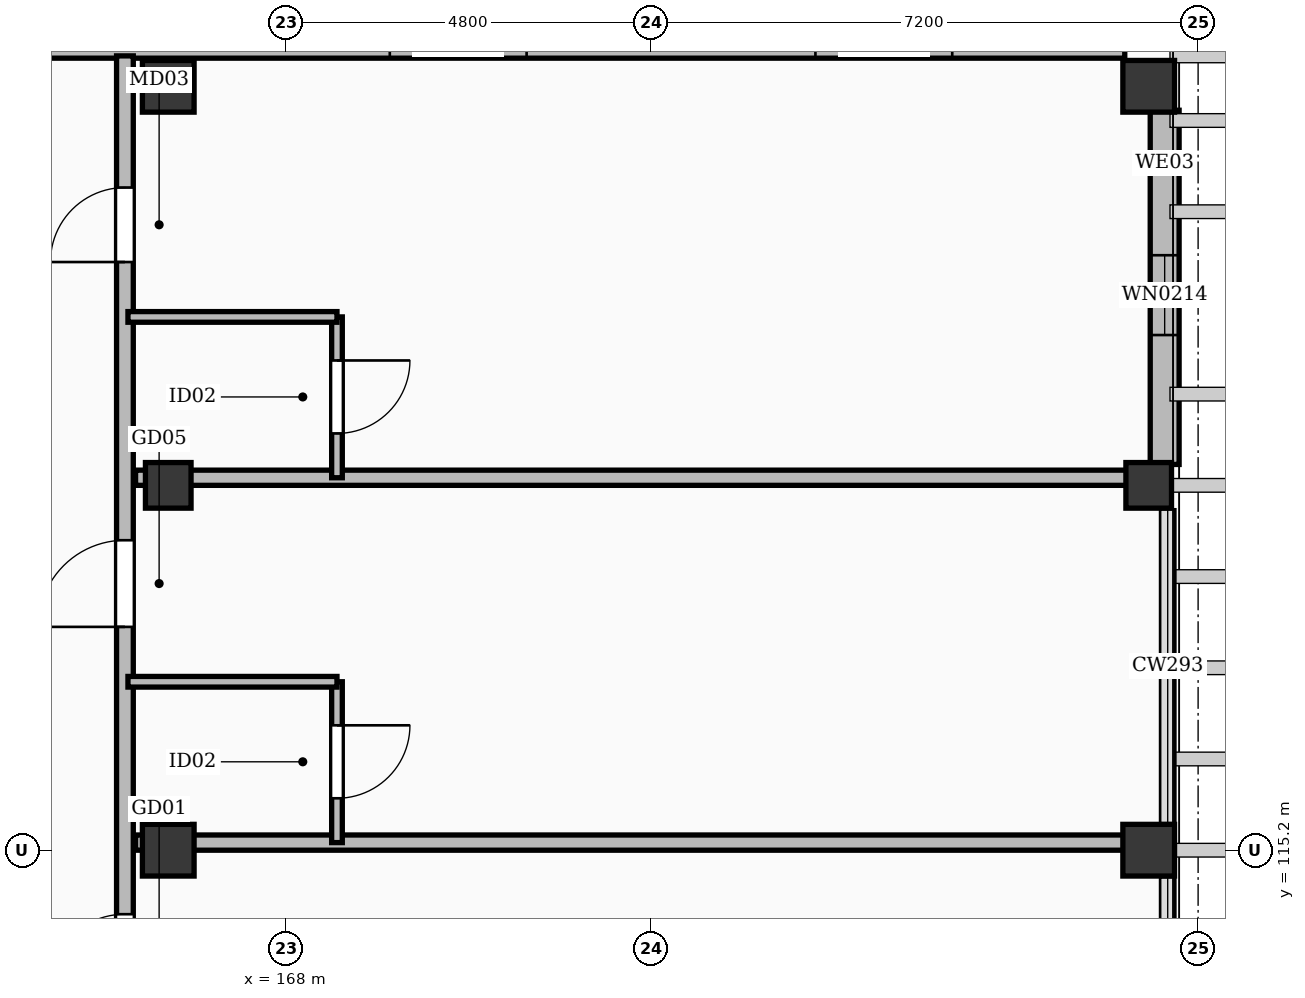
"""IFC4 building model, lengths in metres.
Left out: names, types, materials, properties, quantities, classifications, styles, units other than length and angle.
Written with IfcOpenShell. Run it as: python <this file> out.ifc"""

import sys

from ifc_helpers import new_model, si_unit, direction, frame, frame_2d, origin, origin_2d, place, context, subcontext, project, spatial, rectangle, extrude, element, fill, save


model = new_model("IFC4")
c1 = context("Model", 3, precision=1e-05, world=origin(), true_north=direction((0.0, 1.0)))
c2 = subcontext(c1, "Body", "Model", "MODEL_VIEW")
j1 = project(units=[si_unit("LENGTHUNIT", "METRE"), si_unit("PLANEANGLEUNIT", "RADIAN")], contexts=[c1])
p1 = place(None, origin())
s1 = spatial("IfcSite", under=j1, at=p1, CompositionType="ELEMENT")
p2 = place(p1, origin())
s2 = spatial("IfcBuilding", under=s1, at=p2, CompositionType="ELEMENT")
p3 = place(p2, frame((0.0, 0.0, 35.4)))
s3 = spatial("IfcBuildingStorey", under=s2, at=p3, CompositionType="ELEMENT", Elevation=35.4)
for number, where, z_axis, x_axis in (
    (1, (166.45, 115.2, 0.0), (0.0, 0.0, 1.0), (1.0, 0.0, 0.0)),
    (2, (166.45, 125.25, 0.0), (0.0, 0.0, 1.0), (1.0, 0.0, 0.0)),
    (3, (179.35, 115.2, 0.0), (0.0, 0.0, 1.0), (1.0, 0.0, 0.0)),
    (4, (179.35, 125.25, 0.0), (0.0, 0.0, 1.0), (1.0, 0.0, 0.0)),
):
    element("IfcColumn", number, at=place(p3, frame(where, z_axis=z_axis, x_axis=x_axis)), inside=s3, PredefinedType="COLUMN", context=c2, shape_type="SweptSolid", body=[
        extrude(rectangle(XDim=0.68, YDim=0.68, at=origin_2d()), origin(), (0.0, 0.0, 1.0), 3.6),
    ])
for number, where, z_axis, x_axis in (
    (5, (166.45, 120.0, 0.0), (0.0, 0.0, 1.0), (1.0, 0.0, 0.0)),
    (6, (179.35, 120.0, 0.0), (0.0, 0.0, 1.0), (1.0, 0.0, 0.0)),
):
    element("IfcColumn", number, at=place(p3, frame(where, z_axis=z_axis, x_axis=x_axis)), inside=s3, PredefinedType="COLUMN", context=c2, shape_type="SweptSolid", body=[
        extrude(rectangle(XDim=0.6, YDim=0.6, at=origin_2d()), origin(), (0.0, 0.0, 1.0), 3.6),
    ])
p4 = place(p3, frame((149.765, 125.81, 0.0), z_axis=(0.0, 0.0, 1.0), x_axis=(1.0, 0.0, 0.0)))
e7 = element("IfcWall", 7, at=p4, inside=s3, PredefinedType="SOLIDWALL", context=c2, shape_type="SweptSolid", body=[
    extrude(rectangle(XDim=29.27, YDim=0.38, at=frame_2d((14.635, 0.0))), origin(), (0.0, 0.0, 1.0), 3.36),
])
p5 = place(p4, frame((3.6, 0.0, 0.55)))
e8 = element("IfcOpeningElement", 8, at=p5, cuts=e7, PredefinedType="OPENING", context=c2, shape_type="SweptSolid", body=[
    extrude(rectangle(XDim=1.8, YDim=1.76, at=frame_2d((0.9, 0.88))), frame((0.0, 0.202, 0.0), z_axis=(0.0, -1.0, 0.0), x_axis=(1.0, 0.0, 0.0)), (0.0, 0.0, 1.0), 0.404),
])
p6 = place(p4, frame((9.2, 0.0, 0.55)))
e9 = element("IfcOpeningElement", 9, at=p6, cuts=e7, PredefinedType="OPENING", context=c2, shape_type="SweptSolid", body=[
    extrude(rectangle(XDim=1.8, YDim=1.76, at=frame_2d((0.9, 0.88))), frame((0.0, 0.202, 0.0), z_axis=(0.0, -1.0, 0.0), x_axis=(1.0, 0.0, 0.0)), (0.0, 0.0, 1.0), 0.404),
])
p7 = place(p4, frame((19.6, 0.0, 0.55)))
e10 = element("IfcOpeningElement", 10, at=p7, cuts=e7, PredefinedType="OPENING", context=c2, shape_type="SweptSolid", body=[
    extrude(rectangle(XDim=1.8, YDim=1.76, at=frame_2d((0.9, 0.88))), frame((0.0, 0.202, 0.0), z_axis=(0.0, -1.0, 0.0), x_axis=(1.0, 0.0, 0.0)), (0.0, 0.0, 1.0), 0.404),
])
p8 = place(p4, frame((25.2, 0.0, 0.55)))
e11 = element("IfcOpeningElement", 11, at=p8, cuts=e7, PredefinedType="OPENING", context=c2, shape_type="SweptSolid", body=[
    extrude(rectangle(XDim=1.8, YDim=1.76, at=frame_2d((0.9, 0.88))), frame((0.0, 0.202, 0.0), z_axis=(0.0, -1.0, 0.0), x_axis=(1.0, 0.0, 0.0)), (0.0, 0.0, 1.0), 0.404),
])
p9 = place(p3, frame((179.56, 124.935, 0.0), z_axis=(0.0, 0.0, 1.0), x_axis=(0.0, -1.0, 0.0)))
e12 = element("IfcWall", 12, at=p9, inside=s3, PredefinedType="SOLIDWALL", context=c2, shape_type="SweptSolid", body=[
    extrude(rectangle(XDim=4.66, YDim=0.38, at=frame_2d((2.33, 0.0))), origin(), (0.0, 0.0, 1.0), 2.602),
])
p10 = place(p9, frame((1.907, 0.0, 0.55)))
e13 = element("IfcOpeningElement", 13, at=p10, cuts=e12, PredefinedType="OPENING", context=c2, shape_type="SweptSolid", body=[
    extrude(rectangle(XDim=1.05, YDim=1.65, at=frame_2d((0.525, 0.825))), frame((0.0, 0.202, 0.0), z_axis=(0.0, -1.0, 0.0), x_axis=(1.0, 0.0, 0.0)), (0.0, 0.0, 1.0), 0.404),
])
p11 = place(p3, frame((165.88, 53.15, 0.0), z_axis=(0.0, 0.0, 1.0), x_axis=(0.0, 1.0, 0.0)))
e14 = element("IfcWall", 14, at=p11, inside=s3, PredefinedType="PARTITIONING", context=c2, shape_type="SweptSolid", body=[
    extrude(rectangle(XDim=72.5, YDim=0.22, at=frame_2d((36.25, 0.0))), origin(), (0.0, 0.0, 1.0), 2.602),
])
p12 = place(p11, frame((0.691, 0.0, 0.0)))
e15 = element("IfcOpeningElement", 15, at=p12, cuts=e14, PredefinedType="OPENING", context=c2, shape_type="SweptSolid", body=[
    extrude(rectangle(XDim=1.02, YDim=2.2, at=frame_2d((0.51, 1.1))), frame((0.0, 0.122, 0.0), z_axis=(0.0, -1.0, 0.0), x_axis=(1.0, 0.0, 0.0)), (0.0, 0.0, 1.0), 0.244),
])
p13 = place(p11, frame((7.388, 0.0, 0.0)))
e16 = element("IfcOpeningElement", 16, at=p13, cuts=e14, PredefinedType="OPENING", context=c2, shape_type="SweptSolid", body=[
    extrude(rectangle(XDim=1.14, YDim=2.26, at=frame_2d((0.57, 1.13))), frame((0.0, 0.122, 0.0), z_axis=(0.0, -1.0, 0.0), x_axis=(1.0, 0.0, 0.0)), (0.0, 0.0, 1.0), 0.244),
])
p14 = place(p11, frame((12.188, 0.0, 0.0)))
e17 = element("IfcOpeningElement", 17, at=p14, cuts=e14, PredefinedType="OPENING", context=c2, shape_type="SweptSolid", body=[
    extrude(rectangle(XDim=0.98, YDim=2.15, at=frame_2d((0.49, 1.075))), frame((0.0, 0.122, 0.0), z_axis=(0.0, -1.0, 0.0), x_axis=(1.0, 0.0, 0.0)), (0.0, 0.0, 1.0), 0.244),
])
p15 = place(p11, frame((16.988, 0.0, 0.0)))
e18 = element("IfcOpeningElement", 18, at=p15, cuts=e14, PredefinedType="OPENING", context=c2, shape_type="SweptSolid", body=[
    extrude(rectangle(XDim=1.28, YDim=2.16, at=frame_2d((0.64, 1.08))), frame((0.0, 0.122, 0.0), z_axis=(0.0, -1.0, 0.0), x_axis=(1.0, 0.0, 0.0)), (0.0, 0.0, 1.0), 0.244),
])
p16 = place(p11, frame((21.788, 0.0, 0.0)))
e19 = element("IfcOpeningElement", 19, at=p16, cuts=e14, PredefinedType="OPENING", context=c2, shape_type="SweptSolid", body=[
    extrude(rectangle(XDim=0.9, YDim=2.08, at=frame_2d((0.45, 1.04))), frame((0.0, 0.122, 0.0), z_axis=(0.0, -1.0, 0.0), x_axis=(1.0, 0.0, 0.0)), (0.0, 0.0, 1.0), 0.244),
])
p17 = place(p11, frame((26.588, 0.0, 0.0)))
e20 = element("IfcOpeningElement", 20, at=p17, cuts=e14, PredefinedType="OPENING", context=c2, shape_type="SweptSolid", body=[
    extrude(rectangle(XDim=1.05, YDim=2.22, at=frame_2d((0.525, 1.11))), frame((0.0, 0.122, 0.0), z_axis=(0.0, -1.0, 0.0), x_axis=(1.0, 0.0, 0.0)), (0.0, 0.0, 1.0), 0.244),
])
p18 = place(p11, frame((31.388, 0.0, 0.0)))
e21 = element("IfcOpeningElement", 21, at=p18, cuts=e14, PredefinedType="OPENING", context=c2, shape_type="SweptSolid", body=[
    extrude(rectangle(XDim=1.02, YDim=2.2, at=frame_2d((0.51, 1.1))), frame((0.0, 0.122, 0.0), z_axis=(0.0, -1.0, 0.0), x_axis=(1.0, 0.0, 0.0)), (0.0, 0.0, 1.0), 0.244),
])
p19 = place(p11, frame((36.188, 0.0, 0.0)))
e22 = element("IfcOpeningElement", 22, at=p19, cuts=e14, PredefinedType="OPENING", context=c2, shape_type="SweptSolid", body=[
    extrude(rectangle(XDim=1.14, YDim=2.26, at=frame_2d((0.57, 1.13))), frame((0.0, 0.122, 0.0), z_axis=(0.0, -1.0, 0.0), x_axis=(1.0, 0.0, 0.0)), (0.0, 0.0, 1.0), 0.244),
])
p20 = place(p11, frame((40.988, 0.0, 0.0)))
e23 = element("IfcOpeningElement", 23, at=p20, cuts=e14, PredefinedType="OPENING", context=c2, shape_type="SweptSolid", body=[
    extrude(rectangle(XDim=0.98, YDim=2.15, at=frame_2d((0.49, 1.075))), frame((0.0, 0.122, 0.0), z_axis=(0.0, -1.0, 0.0), x_axis=(1.0, 0.0, 0.0)), (0.0, 0.0, 1.0), 0.244),
])
p21 = place(p11, frame((45.788, 0.0, 0.0)))
e24 = element("IfcOpeningElement", 24, at=p21, cuts=e14, PredefinedType="OPENING", context=c2, shape_type="SweptSolid", body=[
    extrude(rectangle(XDim=1.28, YDim=2.16, at=frame_2d((0.64, 1.08))), frame((0.0, 0.122, 0.0), z_axis=(0.0, -1.0, 0.0), x_axis=(1.0, 0.0, 0.0)), (0.0, 0.0, 1.0), 0.244),
])
p22 = place(p11, frame((50.588, 0.0, 0.0)))
e25 = element("IfcOpeningElement", 25, at=p22, cuts=e14, PredefinedType="OPENING", context=c2, shape_type="SweptSolid", body=[
    extrude(rectangle(XDim=0.9, YDim=2.08, at=frame_2d((0.45, 1.04))), frame((0.0, 0.122, 0.0), z_axis=(0.0, -1.0, 0.0), x_axis=(1.0, 0.0, 0.0)), (0.0, 0.0, 1.0), 0.244),
])
p23 = place(p11, frame((55.388, 0.0, 0.0)))
e26 = element("IfcOpeningElement", 26, at=p23, cuts=e14, PredefinedType="OPENING", context=c2, shape_type="SweptSolid", body=[
    extrude(rectangle(XDim=1.05, YDim=2.22, at=frame_2d((0.525, 1.11))), frame((0.0, 0.122, 0.0), z_axis=(0.0, -1.0, 0.0), x_axis=(1.0, 0.0, 0.0)), (0.0, 0.0, 1.0), 0.244),
])
p24 = place(p11, frame((60.188, 0.0, 0.0)))
e27 = element("IfcOpeningElement", 27, at=p24, cuts=e14, PredefinedType="OPENING", context=c2, shape_type="SweptSolid", body=[
    extrude(rectangle(XDim=1.02, YDim=2.2, at=frame_2d((0.51, 1.1))), frame((0.0, 0.122, 0.0), z_axis=(0.0, -1.0, 0.0), x_axis=(1.0, 0.0, 0.0)), (0.0, 0.0, 1.0), 0.244),
])
p25 = place(p11, frame((64.988, 0.0, 0.0)))
e28 = element("IfcOpeningElement", 28, at=p25, cuts=e14, PredefinedType="OPENING", context=c2, shape_type="SweptSolid", body=[
    extrude(rectangle(XDim=1.14, YDim=2.26, at=frame_2d((0.57, 1.13))), frame((0.0, 0.122, 0.0), z_axis=(0.0, -1.0, 0.0), x_axis=(1.0, 0.0, 0.0)), (0.0, 0.0, 1.0), 0.244),
])
p26 = place(p11, frame((69.788, 0.0, 0.0)))
e29 = element("IfcOpeningElement", 29, at=p26, cuts=e14, PredefinedType="OPENING", context=c2, shape_type="SweptSolid", body=[
    extrude(rectangle(XDim=0.98, YDim=2.15, at=frame_2d((0.49, 1.075))), frame((0.0, 0.122, 0.0), z_axis=(0.0, -1.0, 0.0), x_axis=(1.0, 0.0, 0.0)), (0.0, 0.0, 1.0), 0.244),
])
p27 = place(p3, frame((166.02, 115.3, 0.0), z_axis=(0.0, 0.0, 1.0), x_axis=(1.0, 0.0, 0.0)))
e30 = element("IfcWall", 30, at=p27, inside=s3, PredefinedType="PARTITIONING", context=c2, shape_type="SweptSolid", body=[
    extrude(rectangle(XDim=13.23, YDim=0.2, at=frame_2d((6.615, 0.0))), origin(), (0.0, 0.0, 1.0), 2.602),
])
p28 = place(p3, frame((168.67, 115.3, 0.0), z_axis=(0.0, 0.0, 1.0), x_axis=(0.0, 1.0, 0.0)))
e31 = element("IfcWall", 31, at=p28, inside=s3, PredefinedType="PARTITIONING", context=c2, shape_type="SweptSolid", body=[
    extrude(rectangle(XDim=2.116, YDim=0.14, at=frame_2d((1.058, 0.0))), origin(), (0.0, 0.0, 1.0), 2.732),
])
p29 = place(p28, frame((0.583, 0.0, 0.0)))
e32 = element("IfcOpeningElement", 32, at=p29, cuts=e31, PredefinedType="OPENING", context=c2, shape_type="SweptSolid", body=[
    extrude(rectangle(XDim=0.96, YDim=2.12, at=frame_2d((0.48, 1.06))), frame((0.0, 0.082, 0.0), z_axis=(0.0, -1.0, 0.0), x_axis=(1.0, 0.0, 0.0)), (0.0, 0.0, 1.0), 0.164),
])
p30 = place(p3, frame((165.92, 117.416, 0.0), z_axis=(0.0, 0.0, 1.0), x_axis=(1.0, 0.0, 0.0)))
e33 = element("IfcWall", 33, at=p30, inside=s3, PredefinedType="PARTITIONING", context=c2, shape_type="SweptSolid", body=[
    extrude(rectangle(XDim=2.75, YDim=0.14, at=frame_2d((1.375, 0.0))), origin(), (0.0, 0.0, 1.0), 2.732),
])
p31 = place(p3, frame((166.02, 120.1, 0.0), z_axis=(0.0, 0.0, 1.0), x_axis=(1.0, 0.0, 0.0)))
e34 = element("IfcWall", 34, at=p31, inside=s3, PredefinedType="PARTITIONING", context=c2, shape_type="SweptSolid", body=[
    extrude(rectangle(XDim=13.23, YDim=0.2, at=frame_2d((6.615, 0.0))), origin(), (0.0, 0.0, 1.0), 2.602),
])
p32 = place(p3, frame((168.67, 120.1, 0.0), z_axis=(0.0, 0.0, 1.0), x_axis=(0.0, 1.0, 0.0)))
e35 = element("IfcWall", 35, at=p32, inside=s3, PredefinedType="PARTITIONING", context=c2, shape_type="SweptSolid", body=[
    extrude(rectangle(XDim=2.116, YDim=0.14, at=frame_2d((1.058, 0.0))), origin(), (0.0, 0.0, 1.0), 2.732),
])
p33 = place(p32, frame((0.583, 0.0, 0.0)))
e36 = element("IfcOpeningElement", 36, at=p33, cuts=e35, PredefinedType="OPENING", context=c2, shape_type="SweptSolid", body=[
    extrude(rectangle(XDim=0.96, YDim=2.12, at=frame_2d((0.48, 1.06))), frame((0.0, 0.082, 0.0), z_axis=(0.0, -1.0, 0.0), x_axis=(1.0, 0.0, 0.0)), (0.0, 0.0, 1.0), 0.164),
])
p34 = place(p3, frame((165.92, 122.216, 0.0), z_axis=(0.0, 0.0, 1.0), x_axis=(1.0, 0.0, 0.0)))
e37 = element("IfcWall", 37, at=p34, inside=s3, PredefinedType="PARTITIONING", context=c2, shape_type="SweptSolid", body=[
    extrude(rectangle(XDim=2.75, YDim=0.14, at=frame_2d((1.375, 0.0))), origin(), (0.0, 0.0, 1.0), 2.732),
])
p35 = place(p10, origin())
e38 = element("IfcWindow", 38, at=p35, inside=s3, PartitioningType="SINGLE_PANEL", PredefinedType="WINDOW", context=c2, shape_type="SweptSolid", body=[
    extrude(rectangle(XDim=1.05, YDim=1.65, at=frame_2d((0.525, 0.825))), frame((0.0, 0.03, 0.0), z_axis=(0.0, -1.0, 0.0), x_axis=(1.0, 0.0, 0.0)), (0.0, 0.0, 1.0), 0.06),
])
fill(e13, e38)
p36 = place(p24, origin())
e39 = element("IfcDoor", 39, at=p36, inside=s3, OperationType="SINGLE_SWING_LEFT", PredefinedType="DOOR", context=c2, shape_type="SweptSolid", body=[
    extrude(rectangle(XDim=1.02, YDim=2.2, at=frame_2d((0.51, 1.1))), frame((0.0, 0.025, 0.0), z_axis=(0.0, -1.0, 0.0), x_axis=(1.0, 0.0, 0.0)), (0.0, 0.0, 1.0), 0.05),
])
fill(e27, e39)
p37 = place(p25, origin())
e40 = element("IfcDoor", 40, at=p37, inside=s3, OperationType="SINGLE_SWING_LEFT", PredefinedType="DOOR", context=c2, shape_type="SweptSolid", body=[
    extrude(rectangle(XDim=1.14, YDim=2.26, at=frame_2d((0.57, 1.13))), frame((0.0, 0.025, 0.0), z_axis=(0.0, -1.0, 0.0), x_axis=(1.0, 0.0, 0.0)), (0.0, 0.0, 1.0), 0.05),
])
fill(e28, e40)
p38 = place(p29, frame((0.96, 0.0, 0.0), z_axis=(0.0, 0.0, 1.0), x_axis=(-1.0, 0.0, 0.0)))
e41 = element("IfcDoor", 41, at=p38, inside=s3, OperationType="SINGLE_SWING_RIGHT", PredefinedType="DOOR", context=c2, shape_type="SweptSolid", body=[
    extrude(rectangle(XDim=0.96, YDim=2.12, at=frame_2d((0.48, 1.06))), frame((0.0, 0.025, 0.0), z_axis=(0.0, -1.0, 0.0), x_axis=(1.0, 0.0, 0.0)), (0.0, 0.0, 1.0), 0.05),
])
fill(e32, e41)
p39 = place(p26, origin())
e42 = element("IfcDoor", 42, at=p39, inside=s3, OperationType="SINGLE_SWING_LEFT", PredefinedType="DOOR", context=c2, shape_type="SweptSolid", body=[
    extrude(rectangle(XDim=0.98, YDim=2.15, at=frame_2d((0.49, 1.075))), frame((0.0, 0.025, 0.0), z_axis=(0.0, -1.0, 0.0), x_axis=(1.0, 0.0, 0.0)), (0.0, 0.0, 1.0), 0.05),
])
fill(e29, e42)
p40 = place(p33, frame((0.96, 0.0, 0.0), z_axis=(0.0, 0.0, 1.0), x_axis=(-1.0, 0.0, 0.0)))
e43 = element("IfcDoor", 43, at=p40, inside=s3, OperationType="SINGLE_SWING_RIGHT", PredefinedType="DOOR", context=c2, shape_type="SweptSolid", body=[
    extrude(rectangle(XDim=0.96, YDim=2.12, at=frame_2d((0.48, 1.06))), frame((0.0, 0.025, 0.0), z_axis=(0.0, -1.0, 0.0), x_axis=(1.0, 0.0, 0.0)), (0.0, 0.0, 1.0), 0.05),
])
fill(e36, e43)
save(model, sys.argv[1])
